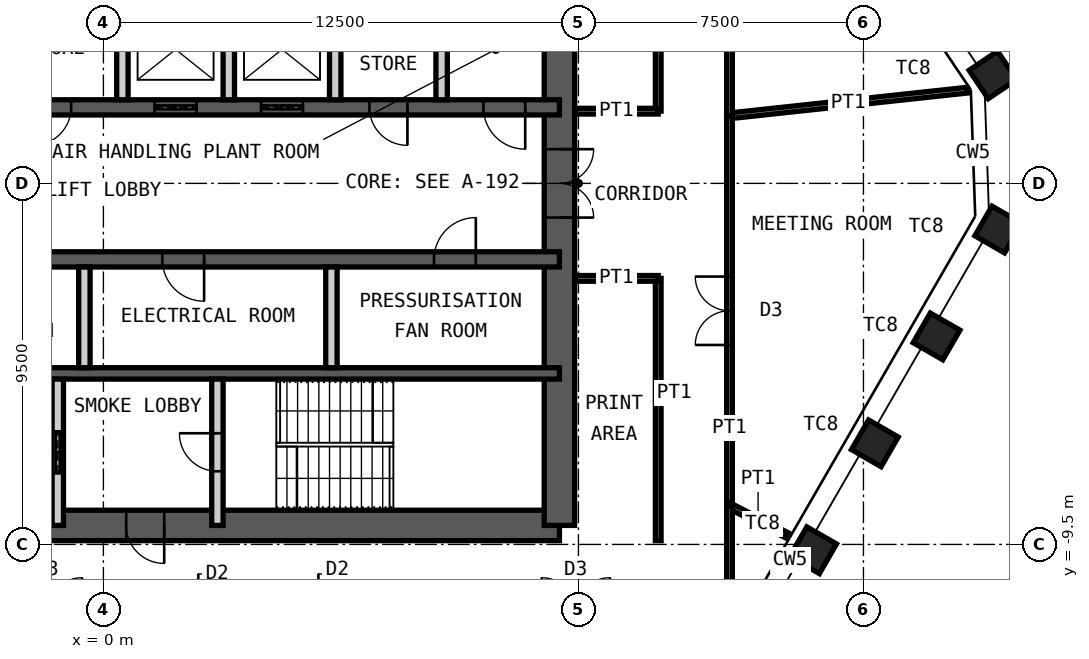
"""IFC4 building model, lengths in metres.
Left out: names, types, materials, properties, quantities, classifications, styles, units other than length and angle.
Written with IfcOpenShell. Run it as: python <this file> out.ifc"""

import sys

from ifc_helpers import new_model, si_unit, direction, frame, frame_2d, origin, origin_2d, place, context, subcontext, project, spatial, rectangle, hollow_rectangle, extrude, element, fill, save


model = new_model("IFC4")
c1 = context("Model", 3, precision=1e-05, world=origin(), true_north=direction((0.0, 1.0)))
c2 = subcontext(c1, "Body", "Model", "MODEL_VIEW")
j1 = project(units=[si_unit("LENGTHUNIT", "METRE"), si_unit("PLANEANGLEUNIT", "RADIAN")], contexts=[c1])
p1 = place(None, origin())
s1 = spatial("IfcSite", under=j1, at=p1, CompositionType="ELEMENT")
p2 = place(p1, origin())
s2 = spatial("IfcBuilding", under=s1, at=p2, CompositionType="ELEMENT")
p3 = place(p2, frame((0.0, 0.0, 316.6)))
s3 = spatial("IfcBuildingStorey", under=s2, at=p3, CompositionType="ELEMENT", Elevation=316.6)
for number, where, z_axis, x_axis in (
    (1, (23.406, 2.854, 0.0), (0.0, 0.0, 1.0), (-0.559, 0.829, 0.0)),
    (2, (23.548, -1.214, 0.0), (0.0, 0.0, 1.0), (0.5, 0.866, 0.0)),
    (3, (21.924, -4.027, 0.0), (0.0, 0.0, 1.0), (0.5, 0.866, 0.0)),
    (4, (20.3, -6.84, 0.0), (0.0, 0.0, 1.0), (0.5, 0.866, 0.0)),
    (5, (18.676, -9.653, 0.0), (0.0, 0.0, 1.0), (0.5, 0.866, 0.0)),
):
    element("IfcColumn", number, at=place(p3, frame(where, z_axis=z_axis, x_axis=x_axis)), inside=s3, PredefinedType="COLUMN", context=c2, shape_type="SweptSolid", body=[
        extrude(hollow_rectangle(XDim=0.9, YDim=0.9, WallThickness=0.05, at=origin_2d()), origin(), (0.0, 0.0, 1.0), 4.2),
    ])
p4 = place(p3, frame((-12.0, -9.0, 0.0), z_axis=(0.0, 0.0, 1.0), x_axis=(1.0, 0.0, 0.0)))
e6 = element("IfcWall", 6, at=p4, inside=s3, PredefinedType="SHEAR", context=c2, shape_type="SweptSolid", body=[
    extrude(rectangle(XDim=24.0, YDim=0.8, at=frame_2d((12.0, 0.0))), origin(), (0.0, 0.0, 1.0), 4.2),
])
p5 = place(p4, frame((1.35, 0.0, 0.0)))
e7 = element("IfcOpeningElement", 7, at=p5, cuts=e6, PredefinedType="OPENING", context=c2, shape_type="SweptSolid", body=[
    extrude(rectangle(XDim=1.0, YDim=2.1, at=frame_2d((0.5, 1.05))), frame((0.0, 0.41, 0.0), z_axis=(0.0, -1.0, 0.0), x_axis=(1.0, 0.0, 0.0)), (0.0, 0.0, 1.0), 0.82),
])
p6 = place(p4, frame((5.325, 0.0, 0.0)))
e8 = element("IfcOpeningElement", 8, at=p6, cuts=e6, PredefinedType="OPENING", context=c2, shape_type="SweptSolid", body=[
    extrude(rectangle(XDim=1.15, YDim=2.1, at=frame_2d((0.575, 1.05))), frame((0.0, 0.41, 0.0), z_axis=(0.0, -1.0, 0.0), x_axis=(1.0, 0.0, 0.0)), (0.0, 0.0, 1.0), 0.82),
])
p7 = place(p4, frame((12.6, 0.0, 0.0)))
e9 = element("IfcOpeningElement", 9, at=p7, cuts=e6, PredefinedType="OPENING", context=c2, shape_type="SweptSolid", body=[
    extrude(rectangle(XDim=1.0, YDim=2.1, at=frame_2d((0.5, 1.05))), frame((0.0, 0.41, 0.0), z_axis=(0.0, -1.0, 0.0), x_axis=(1.0, 0.0, 0.0)), (0.0, 0.0, 1.0), 0.82),
])
p8 = place(p3, frame((12.0, -9.0, 0.0), z_axis=(0.0, 0.0, 1.0), x_axis=(0.0, 1.0, 0.0)))
e10 = element("IfcWall", 10, at=p8, inside=s3, PredefinedType="SHEAR", context=c2, shape_type="SweptSolid", body=[
    extrude(rectangle(XDim=18.0, YDim=0.8, at=frame_2d((9.0, 0.0))), origin(), (0.0, 0.0, 1.0), 4.2),
])
p9 = place(p8, frame((8.1, 0.0, 0.0)))
e11 = element("IfcOpeningElement", 11, at=p9, cuts=e10, PredefinedType="OPENING", context=c2, shape_type="SweptSolid", body=[
    extrude(rectangle(XDim=1.8, YDim=2.1, at=frame_2d((0.9, 1.05))), frame((0.0, 0.41, 0.0), z_axis=(0.0, -1.0, 0.0), x_axis=(1.0, 0.0, 0.0)), (0.0, 0.0, 1.0), 0.82),
])
p10 = place(p3, frame((-12.0, 2.0, 0.0), z_axis=(0.0, 0.0, 1.0), x_axis=(1.0, 0.0, 0.0)))
e12 = element("IfcWall", 12, at=p10, inside=s3, PredefinedType="SHEAR", context=c2, shape_type="SweptSolid", body=[
    extrude(rectangle(XDim=24.0, YDim=0.4, at=frame_2d((12.0, 0.0))), origin(), (0.0, 0.0, 1.0), 4.2),
])
p11 = place(p10, frame((2.4, 0.0, 0.0)))
e13 = element("IfcOpeningElement", 13, at=p11, cuts=e12, PredefinedType="OPENING", context=c2, shape_type="SweptSolid", body=[
    extrude(rectangle(XDim=1.1, YDim=2.1, at=frame_2d((0.55, 1.05))), frame((0.0, 0.21, 0.0), z_axis=(0.0, -1.0, 0.0), x_axis=(1.0, 0.0, 0.0)), (0.0, 0.0, 1.0), 0.42),
])
p12 = place(p10, frame((22.0, 0.0, 0.0)))
e14 = element("IfcOpeningElement", 14, at=p12, cuts=e12, PredefinedType="OPENING", context=c2, shape_type="SweptSolid", body=[
    extrude(rectangle(XDim=1.1, YDim=2.1, at=frame_2d((0.55, 1.05))), frame((0.0, 0.21, 0.0), z_axis=(0.0, -1.0, 0.0), x_axis=(1.0, 0.0, 0.0)), (0.0, 0.0, 1.0), 0.42),
])
p13 = place(p10, frame((10.15, 0.0, 0.0)))
e15 = element("IfcOpeningElement", 15, at=p13, cuts=e12, PredefinedType="OPENING", context=c2, shape_type="SweptSolid", body=[
    extrude(rectangle(XDim=1.0, YDim=2.1, at=frame_2d((0.5, 1.05))), frame((0.0, 0.21, 0.0), z_axis=(0.0, -1.0, 0.0), x_axis=(1.0, 0.0, 0.0)), (0.0, 0.0, 1.0), 0.42),
])
p14 = place(p10, frame((6.9, 0.0, 0.0)))
e16 = element("IfcOpeningElement", 16, at=p14, cuts=e12, PredefinedType="OPENING", context=c2, shape_type="SweptSolid", body=[
    extrude(rectangle(XDim=1.0, YDim=2.1, at=frame_2d((0.5, 1.05))), frame((0.0, 0.21, 0.0), z_axis=(0.0, -1.0, 0.0), x_axis=(1.0, 0.0, 0.0)), (0.0, 0.0, 1.0), 0.42),
])
p15 = place(p10, frame((13.35, 0.0, 0.0)))
e17 = element("IfcOpeningElement", 17, at=p15, cuts=e12, PredefinedType="OPENING", context=c2, shape_type="SweptSolid", body=[
    extrude(rectangle(XDim=1.1, YDim=2.4, at=frame_2d((0.55, 1.2))), frame((0.0, 0.21, 0.0), z_axis=(0.0, -1.0, 0.0), x_axis=(1.0, 0.0, 0.0)), (0.0, 0.0, 1.0), 0.42),
])
p16 = place(p10, frame((16.15, 0.0, 0.0)))
e18 = element("IfcOpeningElement", 18, at=p16, cuts=e12, PredefinedType="OPENING", context=c2, shape_type="SweptSolid", body=[
    extrude(rectangle(XDim=1.1, YDim=2.4, at=frame_2d((0.55, 1.2))), frame((0.0, 0.21, 0.0), z_axis=(0.0, -1.0, 0.0), x_axis=(1.0, 0.0, 0.0)), (0.0, 0.0, 1.0), 0.42),
])
p17 = place(p10, frame((19.0, 0.0, 0.0)))
e19 = element("IfcOpeningElement", 19, at=p17, cuts=e12, PredefinedType="OPENING", context=c2, shape_type="SweptSolid", body=[
    extrude(rectangle(XDim=1.0, YDim=2.1, at=frame_2d((0.5, 1.05))), frame((0.0, 0.21, 0.0), z_axis=(0.0, -1.0, 0.0), x_axis=(1.0, 0.0, 0.0)), (0.0, 0.0, 1.0), 0.42),
])
p18 = place(p3, frame((-12.0, -2.0, 0.0), z_axis=(0.0, 0.0, 1.0), x_axis=(1.0, 0.0, 0.0)))
e20 = element("IfcWall", 20, at=p18, inside=s3, PredefinedType="SHEAR", context=c2, shape_type="SweptSolid", body=[
    extrude(rectangle(XDim=24.0, YDim=0.4, at=frame_2d((12.0, 0.0))), origin(), (0.0, 0.0, 1.0), 4.2),
])
p19 = place(p18, frame((1.1, 0.0, 0.0)))
e21 = element("IfcOpeningElement", 21, at=p19, cuts=e20, PredefinedType="OPENING", context=c2, shape_type="SweptSolid", body=[
    extrude(rectangle(XDim=1.1, YDim=2.1, at=frame_2d((0.55, 1.05))), frame((0.0, 0.21, 0.0), z_axis=(0.0, -1.0, 0.0), x_axis=(1.0, 0.0, 0.0)), (0.0, 0.0, 1.0), 0.42),
])
p20 = place(p18, frame((13.55, 0.0, 0.0)))
e22 = element("IfcOpeningElement", 22, at=p20, cuts=e20, PredefinedType="OPENING", context=c2, shape_type="SweptSolid", body=[
    extrude(rectangle(XDim=1.1, YDim=2.1, at=frame_2d((0.55, 1.05))), frame((0.0, 0.21, 0.0), z_axis=(0.0, -1.0, 0.0), x_axis=(1.0, 0.0, 0.0)), (0.0, 0.0, 1.0), 0.42),
])
p21 = place(p18, frame((20.7, 0.0, 0.0)))
e23 = element("IfcOpeningElement", 23, at=p21, cuts=e20, PredefinedType="OPENING", context=c2, shape_type="SweptSolid", body=[
    extrude(rectangle(XDim=1.1, YDim=2.1, at=frame_2d((0.55, 1.05))), frame((0.0, 0.21, 0.0), z_axis=(0.0, -1.0, 0.0), x_axis=(1.0, 0.0, 0.0)), (0.0, 0.0, 1.0), 0.42),
])
p22 = place(p18, frame((4.0, 0.0, 0.0)))
e24 = element("IfcOpeningElement", 24, at=p22, cuts=e20, PredefinedType="OPENING", context=c2, shape_type="SweptSolid", body=[
    extrude(rectangle(XDim=1.0, YDim=2.1, at=frame_2d((0.5, 1.05))), frame((0.0, 0.21, 0.0), z_axis=(0.0, -1.0, 0.0), x_axis=(1.0, 0.0, 0.0)), (0.0, 0.0, 1.0), 0.42),
])
p23 = place(p18, frame((6.8, 0.0, 0.0)))
e25 = element("IfcOpeningElement", 25, at=p23, cuts=e20, PredefinedType="OPENING", context=c2, shape_type="SweptSolid", body=[
    extrude(rectangle(XDim=1.0, YDim=2.1, at=frame_2d((0.5, 1.05))), frame((0.0, 0.21, 0.0), z_axis=(0.0, -1.0, 0.0), x_axis=(1.0, 0.0, 0.0)), (0.0, 0.0, 1.0), 0.42),
])
p24 = place(p18, frame((9.6, 0.0, 0.0)))
e26 = element("IfcOpeningElement", 26, at=p24, cuts=e20, PredefinedType="OPENING", context=c2, shape_type="SweptSolid", body=[
    extrude(rectangle(XDim=1.0, YDim=2.1, at=frame_2d((0.5, 1.05))), frame((0.0, 0.21, 0.0), z_axis=(0.0, -1.0, 0.0), x_axis=(1.0, 0.0, 0.0)), (0.0, 0.0, 1.0), 0.42),
])
p25 = place(p3, frame((-12.0, -5.0, 0.0), z_axis=(0.0, 0.0, 1.0), x_axis=(1.0, 0.0, 0.0)))
e27 = element("IfcWall", 27, at=p25, inside=s3, PredefinedType="SHEAR", context=c2, shape_type="SweptSolid", body=[
    extrude(rectangle(XDim=24.0, YDim=0.3, at=frame_2d((12.0, 0.0))), origin(), (0.0, 0.0, 1.0), 4.2),
])
for number, where, z_axis, x_axis in (
    (28, (0.5, 2.2, 0.0), (0.0, 0.0, 1.0), (0.0, 1.0, 0.0)),
    (29, (3.3, 2.2, 0.0), (0.0, 0.0, 1.0), (0.0, 1.0, 0.0)),
    (30, (6.1, 2.2, 0.0), (0.0, 0.0, 1.0), (0.0, 1.0, 0.0)),
    (31, (8.9, 2.2, 0.0), (0.0, 0.0, 1.0), (0.0, 1.0, 0.0)),
    (32, (-0.5, -4.85, 0.0), (0.0, 0.0, 1.0), (0.0, 1.0, 0.0)),
    (33, (6.0, -4.85, 0.0), (0.0, 0.0, 1.0), (0.0, 1.0, 0.0)),
):
    element("IfcWall", number, at=place(p3, frame(where, z_axis=z_axis, x_axis=x_axis)), inside=s3, PredefinedType="PARTITIONING", context=c2, shape_type="SweptSolid", body=[
        extrude(rectangle(XDim=2.65, YDim=0.3, at=frame_2d((1.325, 0.0))), origin(), (0.0, 0.0, 1.0), 3.98),
    ])
p26 = place(p3, frame((-1.2, -9.0, 0.0), z_axis=(0.0, 0.0, 1.0), x_axis=(0.0, 1.0, 0.0)))
e34 = element("IfcWall", 34, at=p26, inside=s3, PredefinedType="PARTITIONING", context=c2, shape_type="SweptSolid", body=[
    extrude(rectangle(XDim=3.85, YDim=0.3, at=frame_2d((1.925, 0.0))), origin(), (0.0, 0.0, 1.0), 3.98),
])
p27 = place(p26, frame((1.375, 0.0, 0.0)))
e35 = element("IfcOpeningElement", 35, at=p27, cuts=e34, PredefinedType="OPENING", context=c2, shape_type="SweptSolid", body=[
    extrude(rectangle(XDim=1.1, YDim=2.4, at=frame_2d((0.55, 1.2))), frame((0.0, 0.16, 0.0), z_axis=(0.0, -1.0, 0.0), x_axis=(1.0, 0.0, 0.0)), (0.0, 0.0, 1.0), 0.32),
])
p28 = place(p3, frame((3.0, -9.0, 0.0), z_axis=(0.0, 0.0, 1.0), x_axis=(0.0, 1.0, 0.0)))
e36 = element("IfcWall", 36, at=p28, inside=s3, PredefinedType="PARTITIONING", context=c2, shape_type="SweptSolid", body=[
    extrude(rectangle(XDim=3.85, YDim=0.3, at=frame_2d((1.925, 0.0))), origin(), (0.0, 0.0, 1.0), 3.98),
])
p29 = place(p28, frame((1.425, 0.0, 0.0)))
e37 = element("IfcOpeningElement", 37, at=p29, cuts=e36, PredefinedType="OPENING", context=c2, shape_type="SweptSolid", body=[
    extrude(rectangle(XDim=1.0, YDim=2.1, at=frame_2d((0.5, 1.05))), frame((0.0, 0.16, 0.0), z_axis=(0.0, -1.0, 0.0), x_axis=(1.0, 0.0, 0.0)), (0.0, 0.0, 1.0), 0.32),
])
p30 = place(p3, frame((22.726, 2.452, 0.0), z_axis=(0.0, 0.0, 1.0), x_axis=(-0.994231470971, -0.107255685772, 0.0)))
e38 = element("IfcWall", 38, at=p30, inside=s3, PredefinedType="PARTITIONING", context=c2, shape_type="SweptSolid", body=[
    extrude(rectangle(XDim=6.287, YDim=0.15, at=frame_2d((3.144, 0.0))), origin(), (0.0, 0.0, 1.0), 4.03),
])
p31 = place(p3, frame((16.475, 1.777, 0.0), z_axis=(0.0, 0.0, 1.0), x_axis=(0.0, -1.0, 0.0)))
e39 = element("IfcWall", 39, at=p31, inside=s3, PredefinedType="PARTITIONING", context=c2, shape_type="SweptSolid", body=[
    extrude(rectangle(XDim=10.259, YDim=0.15, at=frame_2d((5.13, 0.0))), origin(), (0.0, 0.0, 1.0), 4.03),
])
p32 = place(p31, frame((4.23, 0.0, 0.0)))
e40 = element("IfcOpeningElement", 40, at=p32, cuts=e39, PredefinedType="OPENING", context=c2, shape_type="SweptSolid", body=[
    extrude(rectangle(XDim=1.8, YDim=2.4, at=frame_2d((0.9, 1.2))), frame((0.0, 0.085, 0.0), z_axis=(0.0, -1.0, 0.0), x_axis=(1.0, 0.0, 0.0)), (0.0, 0.0, 1.0), 0.17),
])
p33 = place(p3, frame((17.98, -9.257, 0.0), z_axis=(0.0, 0.0, 1.0), x_axis=(-0.889058145064, 0.457794292991, 0.0)))
e41 = element("IfcWall", 41, at=p33, inside=s3, PredefinedType="PARTITIONING", context=c2, shape_type="SweptSolid", body=[
    extrude(rectangle(XDim=1.693, YDim=0.15, at=frame_2d((0.847, 0.0))), origin(), (0.0, 0.0, 1.0), 3.33),
])
p34 = place(p3, frame((16.475, -8.482, 0.0), z_axis=(0.0, 0.0, 1.0), x_axis=(0.0, -1.0, 0.0)))
e42 = element("IfcWall", 42, at=p34, inside=s3, PredefinedType="PARTITIONING", context=c2, shape_type="SweptSolid", body=[
    extrude(rectangle(XDim=2.793, YDim=0.15, at=frame_2d((1.396, 0.0))), origin(), (0.0, 0.0, 1.0), 4.03),
])
p35 = place(p3, frame((16.475, 11.275, 0.0), z_axis=(0.0, 0.0, 1.0), x_axis=(0.0, -1.0, 0.0)))
e43 = element("IfcWall", 43, at=p35, inside=s3, PredefinedType="PARTITIONING", context=c2, shape_type="SweptSolid", body=[
    extrude(rectangle(XDim=9.498, YDim=0.15, at=frame_2d((4.749, 0.0))), origin(), (0.0, 0.0, 1.0), 4.03),
])
p36 = place(p35, frame((3.849, 0.0, 0.0)))
e44 = element("IfcOpeningElement", 44, at=p36, cuts=e43, PredefinedType="OPENING", context=c2, shape_type="SweptSolid", body=[
    extrude(rectangle(XDim=1.8, YDim=2.4, at=frame_2d((0.9, 1.2))), frame((0.0, 0.085, 0.0), z_axis=(0.0, -1.0, 0.0), x_axis=(1.0, 0.0, 0.0)), (0.0, 0.0, 1.0), 0.17),
])
p37 = place(p3, frame((14.6, 1.9, 0.0), z_axis=(0.0, 0.0, 1.0), x_axis=(0.0, 1.0, 0.0)))
e45 = element("IfcWall", 45, at=p37, inside=s3, PredefinedType="PARTITIONING", context=c2, shape_type="SweptSolid", body=[
    extrude(rectangle(XDim=7.5, YDim=0.15, at=frame_2d((3.75, 0.0))), origin(), (0.0, 0.0, 1.0), 4.03),
])
p38 = place(p3, frame((12.4, 1.9, 0.0), z_axis=(0.0, 0.0, 1.0), x_axis=(1.0, 0.0, 0.0)))
e46 = element("IfcWall", 46, at=p38, inside=s3, PredefinedType="PARTITIONING", context=c2, shape_type="SweptSolid", body=[
    extrude(rectangle(XDim=2.2, YDim=0.15, at=frame_2d((1.1, 0.0))), origin(), (0.0, 0.0, 1.0), 2.93),
])
p39 = place(p3, frame((14.6, -9.4, 0.0), z_axis=(0.0, 0.0, 1.0), x_axis=(0.0, 1.0, 0.0)))
e47 = element("IfcWall", 47, at=p39, inside=s3, PredefinedType="PARTITIONING", context=c2, shape_type="SweptSolid", body=[
    extrude(rectangle(XDim=6.9, YDim=0.15, at=frame_2d((3.45, 0.0))), origin(), (0.0, 0.0, 1.0), 4.03),
])
p40 = place(p3, frame((12.4, -2.5, 0.0), z_axis=(0.0, 0.0, 1.0), x_axis=(1.0, 0.0, 0.0)))
e48 = element("IfcWall", 48, at=p40, inside=s3, PredefinedType="PARTITIONING", context=c2, shape_type="SweptSolid", body=[
    extrude(rectangle(XDim=2.2, YDim=0.15, at=frame_2d((1.1, 0.0))), origin(), (0.0, 0.0, 1.0), 3.33),
])
p41 = place(p7, origin())
e49 = element("IfcDoor", 49, at=p41, inside=s3, OperationType="SINGLE_SWING_RIGHT", PredefinedType="DOOR", context=c2, shape_type="SweptSolid", body=[
    extrude(rectangle(XDim=1.0, YDim=2.1, at=frame_2d((0.5, 1.05))), frame((0.0, 0.025, 0.0), z_axis=(0.0, -1.0, 0.0), x_axis=(1.0, 0.0, 0.0)), (0.0, 0.0, 1.0), 0.05),
])
fill(e9, e49)
p42 = place(p29, origin())
e50 = element("IfcDoor", 50, at=p42, inside=s3, OperationType="SINGLE_SWING_LEFT", PredefinedType="DOOR", context=c2, shape_type="SweptSolid", body=[
    extrude(rectangle(XDim=1.0, YDim=2.1, at=frame_2d((0.5, 1.05))), frame((0.0, 0.025, 0.0), z_axis=(0.0, -1.0, 0.0), x_axis=(1.0, 0.0, 0.0)), (0.0, 0.0, 1.0), 0.05),
])
fill(e37, e50)
p43 = place(p12, origin())
e51 = element("IfcDoor", 51, at=p43, inside=s3, OperationType="SINGLE_SWING_RIGHT", PredefinedType="DOOR", context=c2, shape_type="SweptSolid", body=[
    extrude(rectangle(XDim=1.1, YDim=2.1, at=frame_2d((0.55, 1.05))), frame((0.0, 0.025, 0.0), z_axis=(0.0, -1.0, 0.0), x_axis=(1.0, 0.0, 0.0)), (0.0, 0.0, 1.0), 0.05),
])
fill(e14, e51)
p44 = place(p13, origin())
e52 = element("IfcDoor", 52, at=p44, inside=s3, OperationType="SINGLE_SWING_LEFT", PredefinedType="DOOR", context=c2, shape_type="SweptSolid", body=[
    extrude(rectangle(XDim=1.0, YDim=2.1, at=frame_2d((0.5, 1.05))), frame((0.0, 0.025, 0.0), z_axis=(0.0, -1.0, 0.0), x_axis=(1.0, 0.0, 0.0)), (0.0, 0.0, 1.0), 0.05),
])
fill(e15, e52)
p45 = place(p20, origin())
e53 = element("IfcDoor", 53, at=p45, inside=s3, OperationType="SINGLE_SWING_RIGHT", PredefinedType="DOOR", context=c2, shape_type="SweptSolid", body=[
    extrude(rectangle(XDim=1.1, YDim=2.1, at=frame_2d((0.55, 1.05))), frame((0.0, 0.025, 0.0), z_axis=(0.0, -1.0, 0.0), x_axis=(1.0, 0.0, 0.0)), (0.0, 0.0, 1.0), 0.05),
])
fill(e22, e53)
p46 = place(p21, origin())
e54 = element("IfcDoor", 54, at=p46, inside=s3, OperationType="SINGLE_SWING_LEFT", PredefinedType="DOOR", context=c2, shape_type="SweptSolid", body=[
    extrude(rectangle(XDim=1.1, YDim=2.1, at=frame_2d((0.55, 1.05))), frame((0.0, 0.025, 0.0), z_axis=(0.0, -1.0, 0.0), x_axis=(1.0, 0.0, 0.0)), (0.0, 0.0, 1.0), 0.05),
])
fill(e23, e54)
p47 = place(p9, origin())
e55 = element("IfcDoor", 55, at=p47, inside=s3, OperationType="DOUBLE_DOOR_DOUBLE_SWING", PredefinedType="DOOR", context=c2, shape_type="SweptSolid", body=[
    extrude(rectangle(XDim=1.8, YDim=2.1, at=frame_2d((0.9, 1.05))), frame((0.0, 0.025, 0.0), z_axis=(0.0, -1.0, 0.0), x_axis=(1.0, 0.0, 0.0)), (0.0, 0.0, 1.0), 0.05),
])
fill(e11, e55)
p48 = place(p27, origin())
e56 = element("IfcDoor", 56, at=p48, inside=s3, OperationType="DOUBLE_DOOR_SLIDING", PredefinedType="DOOR", context=c2, shape_type="SweptSolid", body=[
    extrude(rectangle(XDim=1.1, YDim=2.4, at=frame_2d((0.55, 1.2))), frame((0.0, 0.025, 0.0), z_axis=(0.0, -1.0, 0.0), x_axis=(1.0, 0.0, 0.0)), (0.0, 0.0, 1.0), 0.05),
])
fill(e35, e56)
p49 = place(p15, origin())
e57 = element("IfcDoor", 57, at=p49, inside=s3, OperationType="DOUBLE_DOOR_SLIDING", PredefinedType="DOOR", context=c2, shape_type="SweptSolid", body=[
    extrude(rectangle(XDim=1.1, YDim=2.4, at=frame_2d((0.55, 1.2))), frame((0.0, 0.025, 0.0), z_axis=(0.0, -1.0, 0.0), x_axis=(1.0, 0.0, 0.0)), (0.0, 0.0, 1.0), 0.05),
])
fill(e17, e57)
p50 = place(p16, origin())
e58 = element("IfcDoor", 58, at=p50, inside=s3, OperationType="DOUBLE_DOOR_SLIDING", PredefinedType="DOOR", context=c2, shape_type="SweptSolid", body=[
    extrude(rectangle(XDim=1.1, YDim=2.4, at=frame_2d((0.55, 1.2))), frame((0.0, 0.025, 0.0), z_axis=(0.0, -1.0, 0.0), x_axis=(1.0, 0.0, 0.0)), (0.0, 0.0, 1.0), 0.05),
])
fill(e18, e58)
p51 = place(p17, origin())
e59 = element("IfcDoor", 59, at=p51, inside=s3, OperationType="SINGLE_SWING_RIGHT", PredefinedType="DOOR", context=c2, shape_type="SweptSolid", body=[
    extrude(rectangle(XDim=1.0, YDim=2.1, at=frame_2d((0.5, 1.05))), frame((0.0, 0.025, 0.0), z_axis=(0.0, -1.0, 0.0), x_axis=(1.0, 0.0, 0.0)), (0.0, 0.0, 1.0), 0.05),
])
fill(e19, e59)
p52 = place(p32, origin())
e60 = element("IfcDoor", 60, at=p52, inside=s3, OperationType="DOUBLE_DOOR_DOUBLE_SWING", PredefinedType="DOOR", context=c2, shape_type="SweptSolid", body=[
    extrude(rectangle(XDim=1.8, YDim=2.4, at=frame_2d((0.9, 1.2))), frame((0.0, 0.025, 0.0), z_axis=(0.0, -1.0, 0.0), x_axis=(1.0, 0.0, 0.0)), (0.0, 0.0, 1.0), 0.05),
])
fill(e40, e60)
save(model, sys.argv[1])
